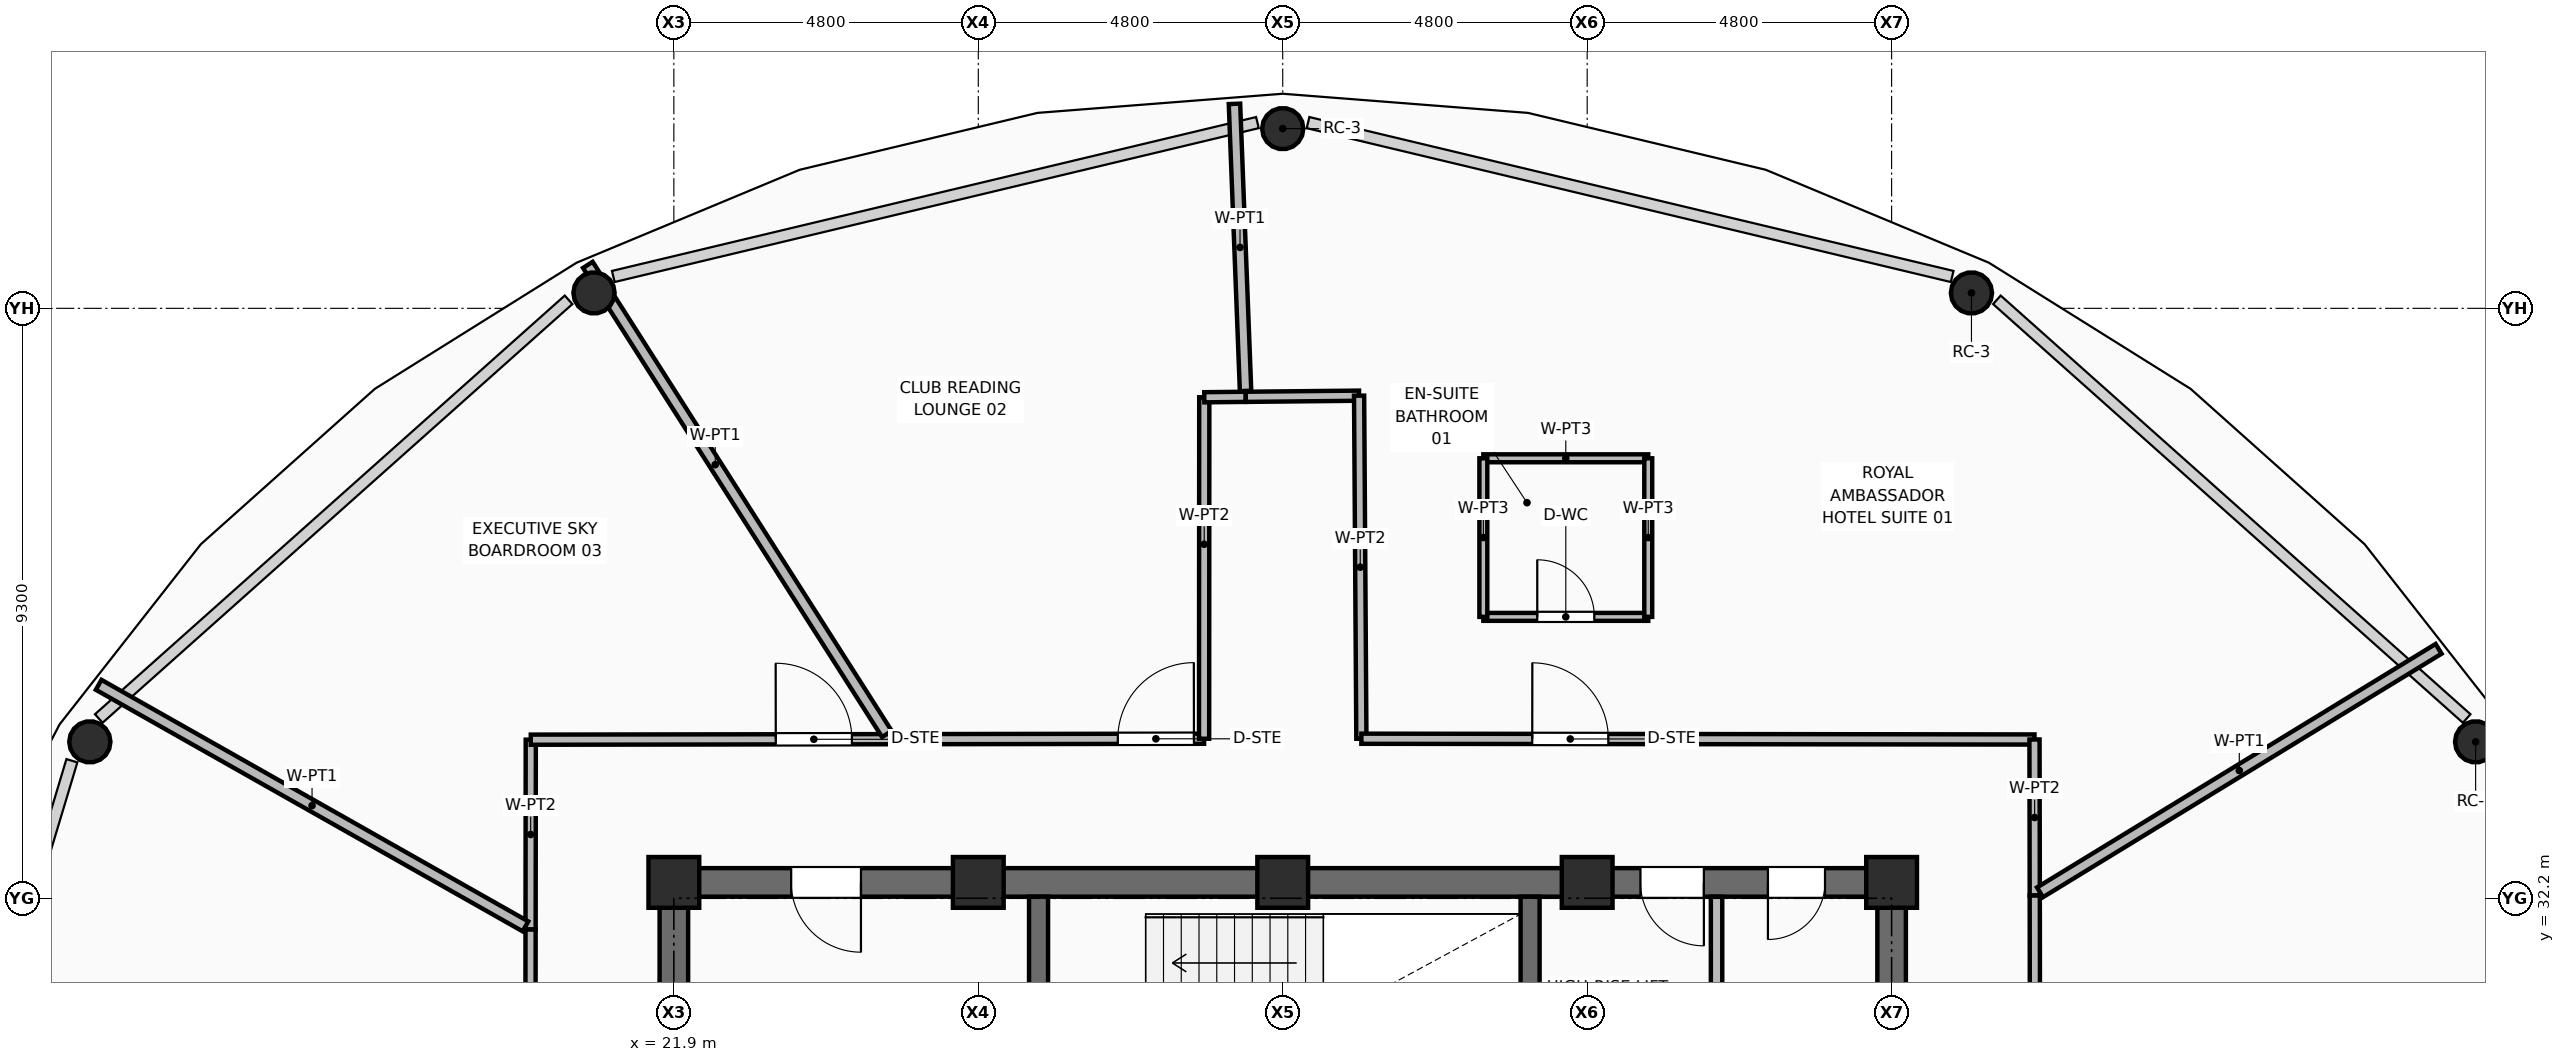
"""IFC4 building model, lengths in metres.
Left out: names, types, materials, properties, quantities, classifications, styles, units other than length and angle.
Written with IfcOpenShell. Run it as: python <this file> out.ifc"""

import sys

from ifc_helpers import new_model, si_unit, direction, frame, frame_2d, origin, origin_2d, place, context, subcontext, project, spatial, rectangle, hollow_circle, extrude, element, fill, save


model = new_model("IFC4")
c1 = context("Model", 3, precision=1e-05, world=origin(), true_north=direction((0.0, 1.0)))
c2 = subcontext(c1, "Body", "Model", "MODEL_VIEW")
j1 = project(units=[si_unit("LENGTHUNIT", "METRE"), si_unit("PLANEANGLEUNIT", "RADIAN")], contexts=[c1])
p1 = place(None, origin())
s1 = spatial("IfcSite", under=j1, at=p1, CompositionType="ELEMENT")
p2 = place(p1, origin())
s2 = spatial("IfcBuilding", under=s1, at=p2, CompositionType="ELEMENT")
p3 = place(p2, frame((0.0, 0.0, 242.4)))
s3 = spatial("IfcBuildingStorey", under=s2, at=p3, CompositionType="ELEMENT", Elevation=242.4)
for number, where, z_axis, x_axis in (
    (1, (21.9, 32.45, 0.0), (0.0, 0.0, 1.0), (1.0, 0.0, 0.0)),
    (2, (26.7, 32.45, 0.0), (0.0, 0.0, 1.0), (1.0, 0.0, 0.0)),
    (3, (31.5, 32.45, 0.0), (0.0, 0.0, 1.0), (1.0, 0.0, 0.0)),
    (4, (36.3, 32.45, 0.0), (0.0, 0.0, 1.0), (1.0, 0.0, 0.0)),
    (5, (41.1, 32.45, 0.0), (0.0, 0.0, 1.0), (1.0, 0.0, 0.0)),
):
    element("IfcColumn", number, at=place(p3, frame(where, z_axis=z_axis, x_axis=x_axis)), inside=s3, PredefinedType="COLUMN", context=c2, shape_type="SweptSolid", body=[
        extrude(rectangle(XDim=0.8, YDim=0.8, at=origin_2d()), origin(), (0.0, 0.0, 1.0), 3.75),
    ])
for number, where, z_axis, x_axis in (
    (6, (50.308, 34.666, 0.0), (0.0, 0.0, 1.0), (1.0, 0.0, 0.0)),
    (7, (42.359, 41.743, 0.0), (0.0, 0.0, 1.0), (1.0, 0.0, 0.0)),
    (8, (31.5, 44.333, 0.0), (0.0, 0.0, 1.0), (1.0, 0.0, 0.0)),
    (9, (20.641, 41.743, 0.0), (0.0, 0.0, 1.0), (1.0, 0.0, 0.0)),
    (10, (12.692, 34.666, 0.0), (0.0, 0.0, 1.0), (1.0, 0.0, 0.0)),
):
    element("IfcColumn", number, at=place(p3, frame(where, z_axis=z_axis, x_axis=x_axis)), inside=s3, PredefinedType="COLUMN", context=c2, shape_type="SweptSolid", body=[
        extrude(hollow_circle(Radius=0.325, WallThickness=0.03, at=origin_2d()), origin(), (0.0, 0.0, 1.0), 3.57),
    ])
p4 = place(p3, frame((21.675, 32.45, 0.0), z_axis=(0.0, 0.0, 1.0), x_axis=(1.0, 0.0, 0.0)))
e11 = element("IfcWall", 11, at=p4, inside=s3, PredefinedType="SHEAR", context=c2, shape_type="SweptSolid", body=[
    extrude(rectangle(XDim=19.65, YDim=0.45, at=frame_2d((9.825, 0.0))), origin(), (0.0, 0.0, 1.0), 3.57),
])
p5 = place(p4, frame((2.075, 0.0, 0.0)))
e12 = element("IfcOpeningElement", 12, at=p5, cuts=e11, PredefinedType="OPENING", context=c2, shape_type="SweptSolid", body=[
    extrude(rectangle(XDim=1.1, YDim=2.1, at=frame_2d((0.55, 1.05))), frame((0.0, 0.235, 0.0), z_axis=(0.0, -1.0, 0.0), x_axis=(1.0, 0.0, 0.0)), (0.0, 0.0, 1.0), 0.47),
])
p6 = place(p4, frame((15.465, 0.0, 0.0)))
e13 = element("IfcOpeningElement", 13, at=p6, cuts=e11, PredefinedType="OPENING", context=c2, shape_type="SweptSolid", body=[
    extrude(rectangle(XDim=1.0, YDim=2.1, at=frame_2d((0.5, 1.05))), frame((0.0, 0.235, 0.0), z_axis=(0.0, -1.0, 0.0), x_axis=(1.0, 0.0, 0.0)), (0.0, 0.0, 1.0), 0.47),
])
p7 = place(p4, frame((17.475, 0.0, 0.0)))
e14 = element("IfcOpeningElement", 14, at=p7, cuts=e11, PredefinedType="OPENING", context=c2, shape_type="SweptSolid", body=[
    extrude(rectangle(XDim=0.9, YDim=2.1, at=frame_2d((0.45, 1.05))), frame((0.0, 0.235, 0.0), z_axis=(0.0, -1.0, 0.0), x_axis=(1.0, 0.0, 0.0)), (0.0, 0.0, 1.0), 0.47),
])
p8 = place(p3, frame((21.9, 18.025, 0.0), z_axis=(0.0, 0.0, 1.0), x_axis=(0.0, 1.0, 0.0)))
e15 = element("IfcWall", 15, at=p8, inside=s3, PredefinedType="SHEAR", context=c2, shape_type="SweptSolid", body=[
    extrude(rectangle(XDim=14.2, YDim=0.45, at=frame_2d((7.1, 0.0))), origin(), (0.0, 0.0, 1.0), 3.57),
])
p9 = place(p3, frame((41.1, 18.025, 0.0), z_axis=(0.0, 0.0, 1.0), x_axis=(0.0, 1.0, 0.0)))
e16 = element("IfcWall", 16, at=p9, inside=s3, PredefinedType="SHEAR", context=c2, shape_type="SweptSolid", body=[
    extrude(rectangle(XDim=14.2, YDim=0.45, at=frame_2d((7.1, 0.0))), origin(), (0.0, 0.0, 1.0), 3.57),
])
p10 = place(p9, frame((3.435, 0.0, 0.0)))
e17 = element("IfcOpeningElement", 17, at=p10, cuts=e16, PredefinedType="OPENING", context=c2, shape_type="SweptSolid", body=[
    extrude(rectangle(XDim=1.05, YDim=2.1, at=frame_2d((0.525, 1.05))), frame((0.0, 0.235, 0.0), z_axis=(0.0, -1.0, 0.0), x_axis=(1.0, 0.0, 0.0)), (0.0, 0.0, 1.0), 0.47),
])
p11 = place(p3, frame((27.65, 28.75, 0.0), z_axis=(0.0, 0.0, 1.0), x_axis=(0.0, 1.0, 0.0)))
e18 = element("IfcWall", 18, at=p11, inside=s3, PredefinedType="SHEAR", context=c2, shape_type="SweptSolid", body=[
    extrude(rectangle(XDim=3.475, YDim=0.3, at=frame_2d((1.738, 0.0))), origin(), (0.0, 0.0, 1.0), 3.57),
])
p12 = place(p11, frame((1.0, 0.0, 0.0)))
e19 = element("IfcOpeningElement", 19, at=p12, cuts=e18, PredefinedType="OPENING", context=c2, shape_type="SweptSolid", body=[
    extrude(rectangle(XDim=1.05, YDim=2.1, at=frame_2d((0.525, 1.05))), frame((0.0, 0.16, 0.0), z_axis=(0.0, -1.0, 0.0), x_axis=(1.0, 0.0, 0.0)), (0.0, 0.0, 1.0), 0.32),
])
p13 = place(p3, frame((35.4, 28.75, 0.0), z_axis=(0.0, 0.0, 1.0), x_axis=(0.0, 1.0, 0.0)))
e20 = element("IfcWall", 20, at=p13, inside=s3, PredefinedType="SHEAR", context=c2, shape_type="SweptSolid", body=[
    extrude(rectangle(XDim=3.475, YDim=0.3, at=frame_2d((1.738, 0.0))), origin(), (0.0, 0.0, 1.0), 3.57),
])
p14 = place(p3, frame((38.34, 28.62, 0.0), z_axis=(0.0, 0.0, 1.0), x_axis=(0.0, 1.0, 0.0)))
e21 = element("IfcWall", 21, at=p14, inside=s3, PredefinedType="PARTITIONING", context=c2, shape_type="SweptSolid", body=[
    extrude(rectangle(XDim=3.605, YDim=0.18, at=frame_2d((1.802, 0.0))), origin(), (0.0, 0.0, 1.0), 3.55),
])
p15 = place(p3, frame((19.636, 26.142, 0.0), z_axis=(0.0, 0.0, 1.0), x_axis=(0.000920648448, 0.999999576203, 0.0)))
e22 = element("IfcWall", 22, at=p15, inside=s3, PredefinedType="PARTITIONING", context=c2, shape_type="SweptSolid", body=[
    extrude(rectangle(XDim=5.569, YDim=0.16, at=frame_2d((2.784, 0.0))), origin(), (0.0, 0.0, 1.0), 3.55),
])
p16 = place(p15, frame((0.16, 0.0, 0.0)))
e23 = element("IfcOpeningElement", 23, at=p16, cuts=e22, PredefinedType="OPENING", context=c2, shape_type="SweptSolid", body=[
    extrude(rectangle(XDim=1.2, YDim=2.1, at=frame_2d((0.6, 1.05))), frame((0.0, 0.09, 0.0), z_axis=(0.0, -1.0, 0.0), x_axis=(1.0, 0.0, 0.0)), (0.0, 0.0, 1.0), 0.18),
])
p17 = place(p3, frame((19.641, 31.711, 0.0), z_axis=(0.0, 0.0, 1.0), x_axis=(0.000980151453, 0.999999519651, 0.0)))
e24 = element("IfcWall", 24, at=p17, inside=s3, PredefinedType="PARTITIONING", context=c2, shape_type="SweptSolid", body=[
    extrude(rectangle(XDim=2.989, YDim=0.16, at=frame_2d((1.495, 0.0))), origin(), (0.0, 0.0, 1.0), 3.081),
])
p18 = place(p3, frame((19.644, 34.7, 0.0), z_axis=(0.0, 0.0, 1.0), x_axis=(0.999998989417, 0.001421677005, 0.0)))
e25 = element("IfcWall", 25, at=p18, inside=s3, PredefinedType="PARTITIONING", context=c2, shape_type="SweptSolid", body=[
    extrude(rectangle(XDim=5.667, YDim=0.16, at=frame_2d((2.833, 0.0))), origin(), (0.0, 0.0, 1.0), 3.081),
])
p19 = place(p18, frame((3.863, 0.0, 0.0)))
e26 = element("IfcOpeningElement", 26, at=p19, cuts=e25, PredefinedType="OPENING", context=c2, shape_type="SweptSolid", body=[
    extrude(rectangle(XDim=1.2, YDim=2.1, at=frame_2d((0.6, 1.05))), frame((0.0, 0.09, 0.0), z_axis=(0.0, -1.0, 0.0), x_axis=(1.0, 0.0, 0.0)), (0.0, 0.0, 1.0), 0.18),
])
p20 = place(p3, frame((25.311, 34.708, 0.0), z_axis=(0.0, 0.0, 1.0), x_axis=(0.999998976672, 0.001430613701, 0.0)))
e27 = element("IfcWall", 27, at=p20, inside=s3, PredefinedType="PARTITIONING", context=c2, shape_type="SweptSolid", body=[
    extrude(rectangle(XDim=4.949, YDim=0.16, at=frame_2d((2.475, 0.0))), origin(), (0.0, 0.0, 1.0), 3.55),
])
p21 = place(p20, frame((3.589, 0.0, 0.0)))
e28 = element("IfcOpeningElement", 28, at=p21, cuts=e27, PredefinedType="OPENING", context=c2, shape_type="SweptSolid", body=[
    extrude(rectangle(XDim=1.2, YDim=2.1, at=frame_2d((0.6, 1.05))), frame((0.0, 0.09, 0.0), z_axis=(0.0, -1.0, 0.0), x_axis=(1.0, 0.0, 0.0)), (0.0, 0.0, 1.0), 0.18),
])
p22 = place(p3, frame((30.26, 34.715, 0.0), z_axis=(0.0, 0.0, 1.0), x_axis=(0.000544266973, 0.999999851887, 0.0)))
e29 = element("IfcWall", 29, at=p22, inside=s3, PredefinedType="PARTITIONING", context=c2, shape_type="SweptSolid", body=[
    extrude(rectangle(XDim=5.383, YDim=0.16, at=frame_2d((2.691, 0.0))), origin(), (0.0, 0.0, 1.0), 3.55),
])
p23 = place(p3, frame((30.263, 40.098, 0.0), z_axis=(0.0, 0.0, 1.0), x_axis=(0.999941415543, 0.010824300504, 0.0)))
e30 = element("IfcWall", 30, at=p23, inside=s3, PredefinedType="PARTITIONING", context=c2, shape_type="SweptSolid", body=[
    extrude(rectangle(XDim=0.654, YDim=0.16, at=frame_2d((0.327, 0.0))), origin(), (0.0, 0.0, 1.0), 3.55),
])
p24 = place(p3, frame((30.917, 40.105, 0.0), z_axis=(0.0, 0.0, 1.0), x_axis=(0.999948905048, 0.010108773084, 0.0)))
e31 = element("IfcWall", 31, at=p24, inside=s3, PredefinedType="PARTITIONING", context=c2, shape_type="SweptSolid", body=[
    extrude(rectangle(XDim=1.787, YDim=0.16, at=frame_2d((0.894, 0.0))), origin(), (0.0, 0.0, 1.0), 3.081),
])
p25 = place(p3, frame((32.704, 40.123, 0.0), z_axis=(0.0, 0.0, 1.0), x_axis=(0.006636123117, -0.999977980693, 0.0)))
e32 = element("IfcWall", 32, at=p25, inside=s3, PredefinedType="PARTITIONING", context=c2, shape_type="SweptSolid", body=[
    extrude(rectangle(XDim=5.408, YDim=0.16, at=frame_2d((2.704, 0.0))), origin(), (0.0, 0.0, 1.0), 3.55),
])
p26 = place(p3, frame((32.74, 34.715, 0.0), z_axis=(0.0, 0.0, 1.0), x_axis=(0.99999933853, -0.001150191321, 0.0)))
e33 = element("IfcWall", 33, at=p26, inside=s3, PredefinedType="PARTITIONING", context=c2, shape_type="SweptSolid", body=[
    extrude(rectangle(XDim=10.613, YDim=0.16, at=frame_2d((5.307, 0.0))), origin(), (0.0, 0.0, 1.0), 3.081),
])
p27 = place(p26, frame((2.694, 0.0, 0.0)))
e34 = element("IfcOpeningElement", 34, at=p27, cuts=e33, PredefinedType="OPENING", context=c2, shape_type="SweptSolid", body=[
    extrude(rectangle(XDim=1.2, YDim=2.1, at=frame_2d((0.6, 1.05))), frame((0.0, 0.09, 0.0), z_axis=(0.0, -1.0, 0.0), x_axis=(1.0, 0.0, 0.0)), (0.0, 0.0, 1.0), 0.18),
])
p28 = place(p3, frame((43.353, 34.703, 0.0), z_axis=(0.0, 0.0, 1.0), x_axis=(0.001587929717, -0.999998739239, 0.0)))
e35 = element("IfcWall", 35, at=p28, inside=s3, PredefinedType="PARTITIONING", context=c2, shape_type="SweptSolid", body=[
    extrude(rectangle(XDim=2.46, YDim=0.16, at=frame_2d((1.23, 0.0))), origin(), (0.0, 0.0, 1.0), 3.081),
])
p29 = place(p3, frame((43.357, 32.243, 0.0), z_axis=(0.0, 0.0, 1.0), x_axis=(0.00127822648, -0.999999183068, 0.0)))
e36 = element("IfcWall", 36, at=p29, inside=s3, PredefinedType="PARTITIONING", context=c2, shape_type="SweptSolid", body=[
    extrude(rectangle(XDim=6.303, YDim=0.16, at=frame_2d((3.151, 0.0))), origin(), (0.0, 0.0, 1.0), 3.55),
])
p30 = place(p29, frame((4.943, 0.0, 0.0)))
e37 = element("IfcOpeningElement", 37, at=p30, cuts=e36, PredefinedType="OPENING", context=c2, shape_type="SweptSolid", body=[
    extrude(rectangle(XDim=1.2, YDim=2.1, at=frame_2d((0.6, 1.05))), frame((0.0, 0.09, 0.0), z_axis=(0.0, -1.0, 0.0), x_axis=(1.0, 0.0, 0.0)), (0.0, 0.0, 1.0), 0.18),
])
p31 = place(p3, frame((43.44, 32.294, 0.0), z_axis=(0.0, 0.0, 1.0), x_axis=(0.853414575763, 0.521232732928, 0.0)))
e38 = element("IfcWall", 38, at=p31, inside=s3, PredefinedType="PARTITIONING", context=c2, shape_type="SweptSolid", body=[
    extrude(rectangle(XDim=7.364, YDim=0.18, at=frame_2d((3.682, 0.0))), origin(), (0.0, 0.0, 1.0), 2.925),
])
p32 = place(p3, frame((30.914, 40.198, 0.0), z_axis=(0.0, 0.0, 1.0), x_axis=(-0.038656743146, 0.999252548763, 0.0)))
e39 = element("IfcWall", 39, at=p32, inside=s3, PredefinedType="PARTITIONING", context=c2, shape_type="SweptSolid", body=[
    extrude(rectangle(XDim=4.528, YDim=0.18, at=frame_2d((2.264, 0.0))), origin(), (0.0, 0.0, 1.0), 2.925),
])
p33 = place(p3, frame((25.259, 34.79, 0.0), z_axis=(0.0, 0.0, 1.0), x_axis=(-0.537619190812, 0.843187764185, 0.0)))
e40 = element("IfcWall", 40, at=p33, inside=s3, PredefinedType="PARTITIONING", context=c2, shape_type="SweptSolid", body=[
    extrude(rectangle(XDim=8.77, YDim=0.18, at=frame_2d((4.385, 0.0))), origin(), (0.0, 0.0, 1.0), 2.925),
])
p34 = place(p3, frame((19.56, 31.757, 0.0), z_axis=(0.0, 0.0, 1.0), x_axis=(-0.870312783113, 0.492499400559, 0.0)))
e41 = element("IfcWall", 41, at=p34, inside=s3, PredefinedType="PARTITIONING", context=c2, shape_type="SweptSolid", body=[
    extrude(rectangle(XDim=7.732, YDim=0.18, at=frame_2d((3.866, 0.0))), origin(), (0.0, 0.0, 1.0), 2.925),
])
p35 = place(p3, frame((34.663, 36.636, 0.0), z_axis=(0.0, 0.0, 1.0), x_axis=(1.0, 0.0, 0.0)))
e42 = element("IfcWall", 42, at=p35, inside=s3, PredefinedType="PARTITIONING", context=c2, shape_type="SweptSolid", body=[
    extrude(rectangle(XDim=2.6, YDim=0.125, at=frame_2d((1.3, 0.0))), origin(), (0.0, 0.0, 1.0), 3.55),
])
p36 = place(p35, frame((0.85, 0.0, 0.0)))
e43 = element("IfcOpeningElement", 43, at=p36, cuts=e42, PredefinedType="OPENING", context=c2, shape_type="SweptSolid", body=[
    extrude(rectangle(XDim=0.9, YDim=2.1, at=frame_2d((0.45, 1.05))), frame((0.0, 0.073, 0.0), z_axis=(0.0, -1.0, 0.0), x_axis=(1.0, 0.0, 0.0)), (0.0, 0.0, 1.0), 0.145),
])
p37 = place(p3, frame((34.663, 39.136, 0.0), z_axis=(0.0, 0.0, 1.0), x_axis=(1.0, 0.0, 0.0)))
e44 = element("IfcWall", 44, at=p37, inside=s3, PredefinedType="PARTITIONING", context=c2, shape_type="SweptSolid", body=[
    extrude(rectangle(XDim=2.6, YDim=0.125, at=frame_2d((1.3, 0.0))), origin(), (0.0, 0.0, 1.0), 3.55),
])
for number, where, z_axis, x_axis in (
    (45, (34.663, 36.636, 0.0), (0.0, 0.0, 1.0), (0.0, 1.0, 0.0)),
    (46, (37.263, 36.636, 0.0), (0.0, 0.0, 1.0), (0.0, 1.0, 0.0)),
):
    element("IfcWall", number, at=place(p3, frame(where, z_axis=z_axis, x_axis=x_axis)), inside=s3, PredefinedType="PARTITIONING", context=c2, shape_type="SweptSolid", body=[
        extrude(rectangle(XDim=2.5, YDim=0.125, at=frame_2d((1.25, 0.0))), origin(), (0.0, 0.0, 1.0), 3.55),
    ])
p38 = place(p5, frame((1.1, 0.0, 0.0), z_axis=(0.0, 0.0, 1.0), x_axis=(-1.0, 0.0, 0.0)))
e47 = element("IfcDoor", 47, at=p38, inside=s3, OperationType="SINGLE_SWING_LEFT", PredefinedType="DOOR", context=c2, shape_type="SweptSolid", body=[
    extrude(rectangle(XDim=1.1, YDim=2.1, at=frame_2d((0.55, 1.05))), frame((0.0, 0.025, 0.0), z_axis=(0.0, -1.0, 0.0), x_axis=(1.0, 0.0, 0.0)), (0.0, 0.0, 1.0), 0.05),
])
fill(e12, e47)
p39 = place(p6, frame((1.0, 0.0, 0.0), z_axis=(0.0, 0.0, 1.0), x_axis=(-1.0, 0.0, 0.0)))
e48 = element("IfcDoor", 48, at=p39, inside=s3, OperationType="SINGLE_SWING_LEFT", PredefinedType="DOOR", context=c2, shape_type="SweptSolid", body=[
    extrude(rectangle(XDim=1.0, YDim=2.1, at=frame_2d((0.5, 1.05))), frame((0.0, 0.025, 0.0), z_axis=(0.0, -1.0, 0.0), x_axis=(1.0, 0.0, 0.0)), (0.0, 0.0, 1.0), 0.05),
])
fill(e13, e48)
p40 = place(p7, frame((0.9, 0.0, 0.0), z_axis=(0.0, 0.0, 1.0), x_axis=(-1.0, 0.0, 0.0)))
e49 = element("IfcDoor", 49, at=p40, inside=s3, OperationType="SINGLE_SWING_RIGHT", PredefinedType="DOOR", context=c2, shape_type="SweptSolid", body=[
    extrude(rectangle(XDim=0.9, YDim=2.1, at=frame_2d((0.45, 1.05))), frame((0.0, 0.025, 0.0), z_axis=(0.0, -1.0, 0.0), x_axis=(1.0, 0.0, 0.0)), (0.0, 0.0, 1.0), 0.05),
])
fill(e14, e49)
p41 = place(p36, origin())
e50 = element("IfcDoor", 50, at=p41, inside=s3, OperationType="SINGLE_SWING_LEFT", PredefinedType="DOOR", context=c2, shape_type="SweptSolid", body=[
    extrude(rectangle(XDim=0.9, YDim=2.1, at=frame_2d((0.45, 1.05))), frame((0.0, 0.025, 0.0), z_axis=(0.0, -1.0, 0.0), x_axis=(1.0, 0.0, 0.0)), (0.0, 0.0, 1.0), 0.05),
])
fill(e43, e50)
p42 = place(p27, origin())
e51 = element("IfcDoor", 51, at=p42, inside=s3, OperationType="SINGLE_SWING_LEFT", PredefinedType="DOOR", context=c2, shape_type="SweptSolid", body=[
    extrude(rectangle(XDim=1.2, YDim=2.1, at=frame_2d((0.6, 1.05))), frame((0.0, 0.025, 0.0), z_axis=(0.0, -1.0, 0.0), x_axis=(1.0, 0.0, 0.0)), (0.0, 0.0, 1.0), 0.05),
])
fill(e34, e51)
p43 = place(p21, origin())
e52 = element("IfcDoor", 52, at=p43, inside=s3, OperationType="SINGLE_SWING_RIGHT", PredefinedType="DOOR", context=c2, shape_type="SweptSolid", body=[
    extrude(rectangle(XDim=1.2, YDim=2.1, at=frame_2d((0.6, 1.05))), frame((0.0, 0.025, 0.0), z_axis=(0.0, -1.0, 0.0), x_axis=(1.0, 0.0, 0.0)), (0.0, 0.0, 1.0), 0.05),
])
fill(e28, e52)
p44 = place(p19, origin())
e53 = element("IfcDoor", 53, at=p44, inside=s3, OperationType="SINGLE_SWING_LEFT", PredefinedType="DOOR", context=c2, shape_type="SweptSolid", body=[
    extrude(rectangle(XDim=1.2, YDim=2.1, at=frame_2d((0.6, 1.05))), frame((0.0, 0.025, 0.0), z_axis=(0.0, -1.0, 0.0), x_axis=(1.0, 0.0, 0.0)), (0.0, 0.0, 1.0), 0.05),
])
fill(e26, e53)
save(model, sys.argv[1])
